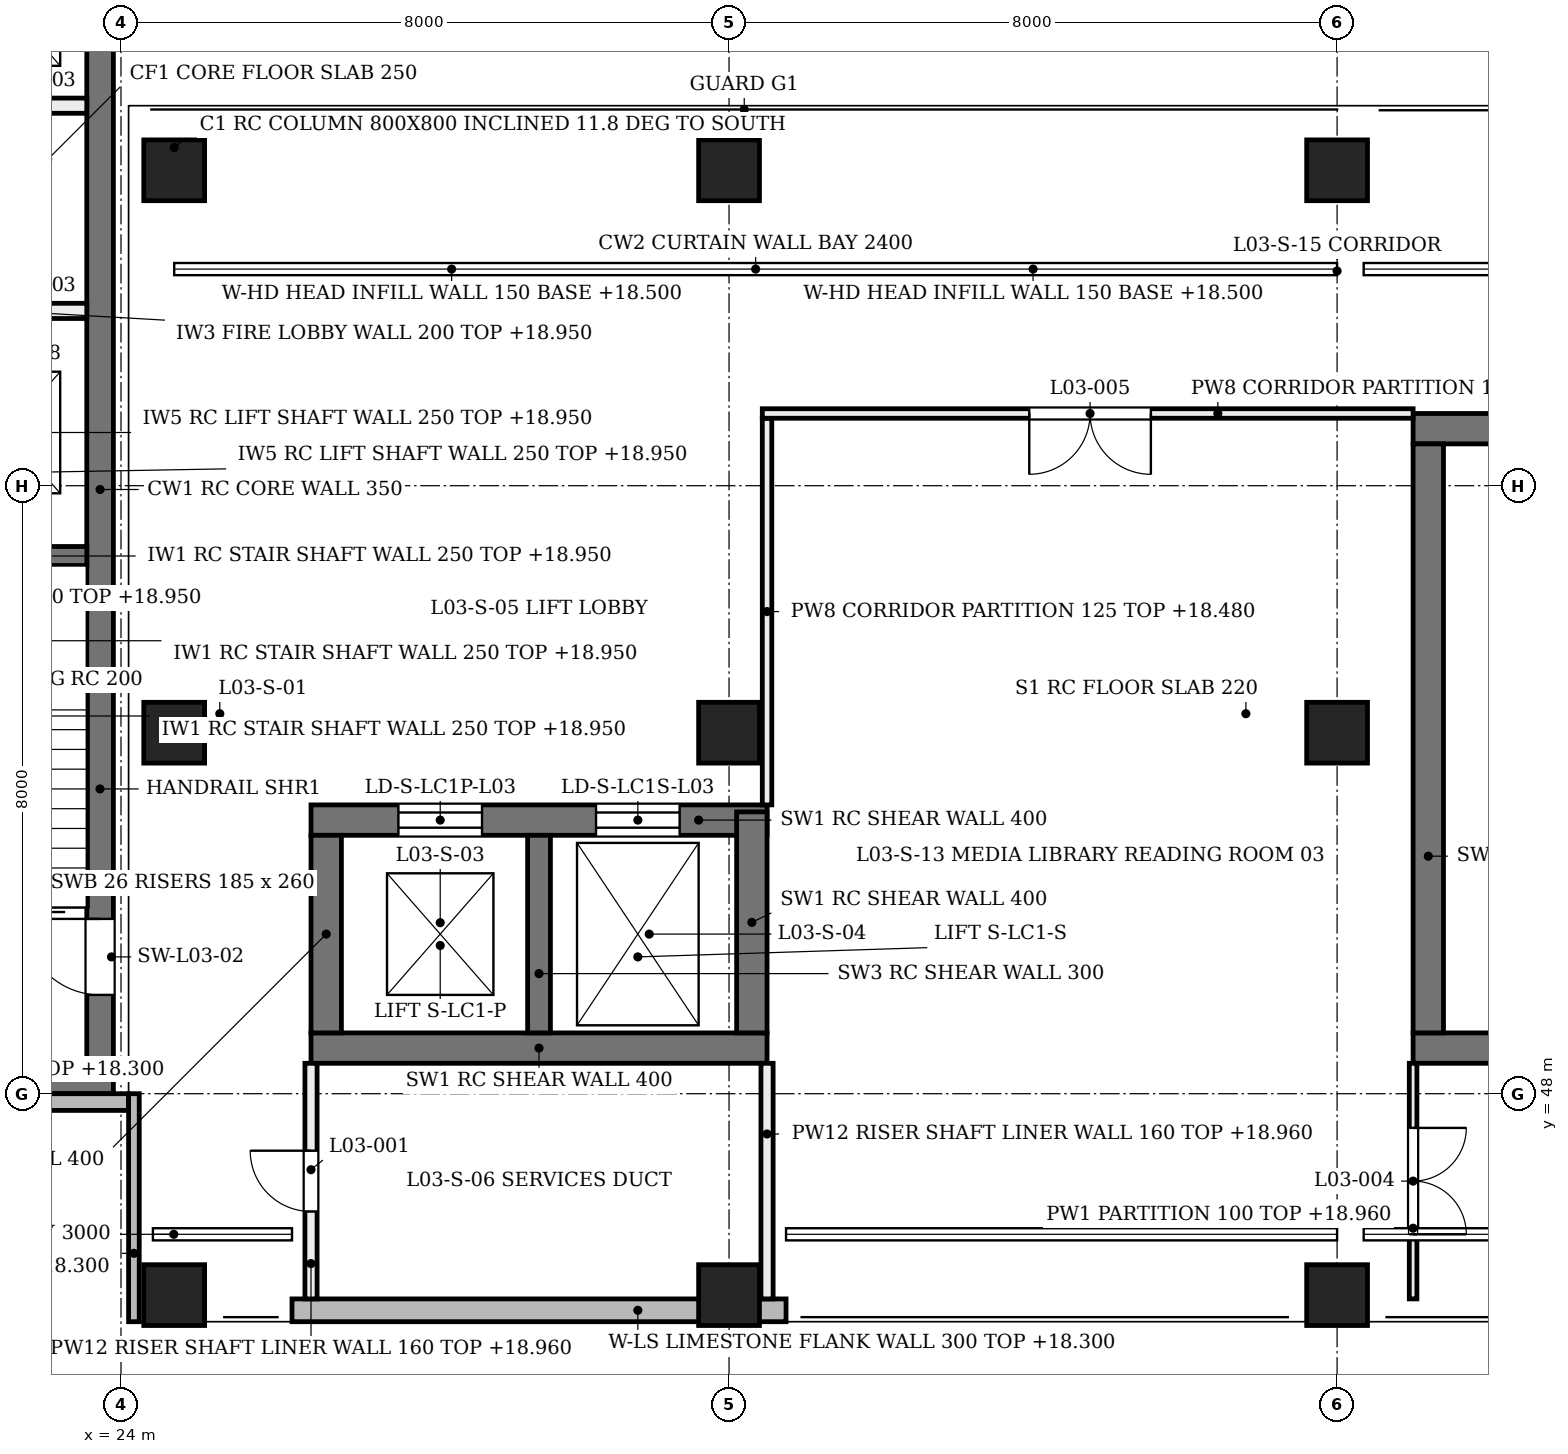
"""IFC4 building model, lengths in metres.
Left out: names, types, materials, properties, quantities, classifications, styles, units other than length and angle.
Written with IfcOpenShell. Run it as: python <this file> out.ifc"""

import sys

from ifc_helpers import new_model, si_unit, direction, frame, frame_2d, origin, origin_2d, place, context, subcontext, project, spatial, rectangle, extrude, element, fill, save


model = new_model("IFC4")
c1 = context("Model", 3, precision=1e-05, world=origin(), true_north=direction((0.0, 1.0)))
c2 = subcontext(c1, "Body", "Model", "MODEL_VIEW")
j1 = project(units=[si_unit("LENGTHUNIT", "METRE"), si_unit("PLANEANGLEUNIT", "RADIAN")], contexts=[c1])
p1 = place(None, origin())
s1 = spatial("IfcSite", under=j1, at=p1, CompositionType="ELEMENT")
p2 = place(p1, origin())
s2 = spatial("IfcBuilding", under=s1, at=p2, CompositionType="ELEMENT")
p3 = place(p2, frame((0.0, 0.0, 14.4)))
s3 = spatial("IfcBuildingStorey", under=s2, at=p3, CompositionType="ELEMENT", Elevation=14.4)
p4 = place(p3, frame((26.5, 48.6, 0.0), z_axis=(0.0, 0.0, 1.0), x_axis=(1.0, 0.0, 0.0)))
e1 = element("IfcWall", 1, at=p4, inside=s3, PredefinedType="SHEAR", context=c2, shape_type="SweptSolid", body=[
    extrude(rectangle(XDim=6.0, YDim=0.4, at=frame_2d((3.0, 0.0))), origin(), (0.0, 0.0, 1.0), 4.58),
])
p5 = place(p3, frame((26.5, 51.6, 0.0), z_axis=(0.0, 0.0, 1.0), x_axis=(1.0, 0.0, 0.0)))
e2 = element("IfcWall", 2, at=p5, inside=s3, PredefinedType="SHEAR", context=c2, shape_type="SweptSolid", body=[
    extrude(rectangle(XDim=6.0, YDim=0.4, at=frame_2d((3.0, 0.0))), origin(), (0.0, 0.0, 1.0), 4.58),
])
p6 = place(p5, frame((1.15, 0.0, 0.0)))
e3 = element("IfcOpeningElement", 3, at=p6, cuts=e2, PredefinedType="OPENING", context=c2, shape_type="SweptSolid", body=[
    extrude(rectangle(XDim=1.1, YDim=2.1, at=frame_2d((0.55, 1.05))), frame((0.0, 0.21, 0.0), z_axis=(0.0, -1.0, 0.0), x_axis=(1.0, 0.0, 0.0)), (0.0, 0.0, 1.0), 0.42),
])
p7 = place(p5, frame((3.75, 0.0, 0.0)))
e4 = element("IfcOpeningElement", 4, at=p7, cuts=e2, PredefinedType="OPENING", context=c2, shape_type="SweptSolid", body=[
    extrude(rectangle(XDim=1.1, YDim=2.1, at=frame_2d((0.55, 1.05))), frame((0.0, 0.21, 0.0), z_axis=(0.0, -1.0, 0.0), x_axis=(1.0, 0.0, 0.0)), (0.0, 0.0, 1.0), 0.42),
])
p8 = place(p3, frame((26.7, 48.8, 0.0), z_axis=(0.0, 0.0, 1.0), x_axis=(0.0, 1.0, 0.0)))
e5 = element("IfcWall", 5, at=p8, inside=s3, PredefinedType="SHEAR", context=c2, shape_type="SweptSolid", body=[
    extrude(rectangle(XDim=2.6, YDim=0.4, at=frame_2d((1.3, 0.0))), origin(), (0.0, 0.0, 1.0), 4.58),
])
p9 = place(p3, frame((32.3, 48.8, 0.0), z_axis=(0.0, 0.0, 1.0), x_axis=(0.0, 1.0, 0.0)))
e6 = element("IfcWall", 6, at=p9, inside=s3, PredefinedType="SHEAR", context=c2, shape_type="SweptSolid", body=[
    extrude(rectangle(XDim=2.908, YDim=0.4, at=frame_2d((1.454, 0.0))), origin(), (0.0, 0.0, 1.0), 4.58),
])
p10 = place(p3, frame((29.5, 48.8, 0.0), z_axis=(0.0, 0.0, 1.0), x_axis=(0.0, 1.0, 0.0)))
e7 = element("IfcWall", 7, at=p10, inside=s3, PredefinedType="SHEAR", context=c2, shape_type="SweptSolid", body=[
    extrude(rectangle(XDim=2.6, YDim=0.3, at=frame_2d((1.3, 0.0))), origin(), (0.0, 0.0, 1.0), 4.58),
])
p11 = place(p3, frame((41.0, 48.6, 0.0), z_axis=(0.0, 0.0, 1.0), x_axis=(1.0, 0.0, 0.0)))
e8 = element("IfcWall", 8, at=p11, inside=s3, PredefinedType="SHEAR", context=c2, shape_type="SweptSolid", body=[
    extrude(rectangle(XDim=22.0, YDim=0.4, at=frame_2d((11.0, 0.0))), origin(), (0.0, 0.0, 1.0), 4.58),
])
p12 = place(p3, frame((41.0, 56.75, 0.0), z_axis=(0.0, 0.0, 1.0), x_axis=(1.0, 0.0, 0.0)))
e9 = element("IfcWall", 9, at=p12, inside=s3, PredefinedType="SHEAR", context=c2, shape_type="SweptSolid", body=[
    extrude(rectangle(XDim=22.0, YDim=0.4, at=frame_2d((11.0, 0.0))), origin(), (0.0, 0.0, 1.0), 4.58),
])
p13 = place(p12, frame((10.366, 0.0, 0.0)))
e10 = element("IfcOpeningElement", 10, at=p13, cuts=e9, PredefinedType="OPENING", context=c2, shape_type="SweptSolid", body=[
    extrude(rectangle(XDim=1.5, YDim=2.1, at=frame_2d((0.75, 1.05))), frame((0.0, 0.21, 0.0), z_axis=(0.0, -1.0, 0.0), x_axis=(1.0, 0.0, 0.0)), (0.0, 0.0, 1.0), 0.42),
])
p14 = place(p3, frame((41.2, 48.8, 0.0), z_axis=(0.0, 0.0, 1.0), x_axis=(0.0, 1.0, 0.0)))
e11 = element("IfcWall", 11, at=p14, inside=s3, PredefinedType="SHEAR", context=c2, shape_type="SweptSolid", body=[
    extrude(rectangle(XDim=7.75, YDim=0.4, at=frame_2d((3.875, 0.0))), origin(), (0.0, 0.0, 1.0), 4.58),
])
p15 = place(p3, frame((15.95, 48.175, 0.0), z_axis=(0.0, 0.0, 1.0), x_axis=(1.0, 0.0, 0.0)))
e12 = element("IfcWall", 12, at=p15, inside=s3, PredefinedType="SHEAR", context=c2, shape_type="SweptSolid", body=[
    extrude(rectangle(XDim=7.95, YDim=0.35, at=frame_2d((3.975, 0.0))), origin(), (0.0, 0.0, 1.0), 4.58),
])
p16 = place(p3, frame((23.725, 48.35, 0.0), z_axis=(0.0, 0.0, 1.0), x_axis=(0.0, 1.0, 0.0)))
e13 = element("IfcWall", 13, at=p16, inside=s3, PredefinedType="SHEAR", context=c2, shape_type="SweptSolid", body=[
    extrude(rectangle(XDim=15.2, YDim=0.35, at=frame_2d((7.6, 0.0))), origin(), (0.0, 0.0, 1.0), 4.58),
])
p17 = place(p16, frame((0.95, 0.0, 0.0)))
e14 = element("IfcOpeningElement", 14, at=p17, cuts=e13, PredefinedType="OPENING", context=c2, shape_type="SweptSolid", body=[
    extrude(rectangle(XDim=1.0, YDim=2.1, at=frame_2d((0.5, 1.05))), frame((0.0, 0.185, 0.0), z_axis=(0.0, -1.0, 0.0), x_axis=(1.0, 0.0, 0.0)), (0.0, 0.0, 1.0), 0.37),
])
for number, where, z_axis, x_axis in (
    (15, (24.7, 45.6, 0.0), (0.0, -0.204, 0.979), (1.0, 0.0, 0.0)),
    (16, (32.0, 45.6, 0.0), (0.0, -0.204, 0.979), (1.0, 0.0, 0.0)),
    (17, (40.0, 45.6, 0.0), (0.0, -0.204, 0.979), (1.0, 0.0, 0.0)),
    (18, (24.7, 53.0, 0.0), (0.0, -0.204, 0.979), (1.0, 0.0, 0.0)),
    (19, (32.0, 53.0, 0.0), (0.0, -0.204, 0.979), (1.0, 0.0, 0.0)),
    (20, (40.0, 53.0, 0.0), (0.0, -0.204, 0.979), (1.0, 0.0, 0.0)),
    (21, (24.7, 60.4, 0.0), (0.0, -0.204, 0.979), (1.0, 0.0, 0.0)),
    (22, (32.0, 60.4, 0.0), (0.0, -0.204, 0.979), (1.0, 0.0, 0.0)),
    (23, (40.0, 60.4, 0.0), (0.0, -0.204, 0.979), (1.0, 0.0, 0.0)),
):
    element("IfcColumn", number, at=place(p3, frame(where, z_axis=z_axis, x_axis=x_axis)), inside=s3, PredefinedType="COLUMN", context=c2, shape_type="SweptSolid", body=[
        extrude(rectangle(XDim=0.8, YDim=0.8, at=origin_2d()), origin(), (0.0, 0.0, 1.0), 4.903),
    ])
p18 = place(p3, frame((26.25, 45.15, 0.0), z_axis=(0.0, 0.0, 1.0), x_axis=(1.0, 0.0, 0.0)))
e24 = element("IfcWall", 24, at=p18, inside=s3, PredefinedType="SOLIDWALL", context=c2, shape_type="SweptSolid", body=[
    extrude(rectangle(XDim=6.5, YDim=0.3, at=frame_2d((3.25, 0.0))), origin(), (0.0, 0.0, 1.0), 3.9),
])
p19 = place(p3, frame((24.9, 58.85, 4.1), z_axis=(0.0, 0.0, 1.0), x_axis=(1.0, 0.0, 0.0)))
e25 = element("IfcWall", 25, at=p19, inside=s3, PredefinedType="SOLIDWALL", context=c2, shape_type="SweptSolid", body=[
    extrude(rectangle(XDim=6.9, YDim=0.15, at=frame_2d((3.45, 0.0))), origin(), (0.0, 0.0, 1.0), 0.48),
])
p20 = place(p3, frame((32.2, 58.85, 4.1), z_axis=(0.0, 0.0, 1.0), x_axis=(1.0, 0.0, 0.0)))
e26 = element("IfcWall", 26, at=p20, inside=s3, PredefinedType="SOLIDWALL", context=c2, shape_type="SweptSolid", body=[
    extrude(rectangle(XDim=7.6, YDim=0.15, at=frame_2d((3.8, 0.0))), origin(), (0.0, 0.0, 1.0), 0.48),
])
p21 = place(p3, frame((15.9, 47.89, 0.0), z_axis=(0.0, 0.0, 1.0), x_axis=(1.0, 0.0, 0.0)))
e27 = element("IfcWall", 27, at=p21, inside=s3, PredefinedType="SOLIDWALL", context=c2, shape_type="SweptSolid", body=[
    extrude(rectangle(XDim=8.2, YDim=0.22, at=frame_2d((4.1, 0.0))), origin(), (0.0, 0.0, 1.0), 3.9),
])
p22 = place(p21, frame((1.108, 0.0, 0.9)))
e28 = element("IfcOpeningElement", 28, at=p22, cuts=e27, PredefinedType="OPENING", context=c2, shape_type="SweptSolid", body=[
    extrude(rectangle(XDim=0.45, YDim=2.6, at=frame_2d((0.225, 1.3))), frame((0.0, 0.12, 0.0), z_axis=(0.0, -1.0, 0.0), x_axis=(1.0, 0.0, 0.0)), (0.0, 0.0, 1.0), 0.24),
])
p23 = place(p21, frame((3.775, 0.0, 0.9)))
e29 = element("IfcOpeningElement", 29, at=p23, cuts=e27, PredefinedType="OPENING", context=c2, shape_type="SweptSolid", body=[
    extrude(rectangle(XDim=0.45, YDim=2.6, at=frame_2d((0.225, 1.3))), frame((0.0, 0.12, 0.0), z_axis=(0.0, -1.0, 0.0), x_axis=(1.0, 0.0, 0.0)), (0.0, 0.0, 1.0), 0.24),
])
p24 = place(p21, frame((6.442, 0.0, 0.9)))
e30 = element("IfcOpeningElement", 30, at=p24, cuts=e27, PredefinedType="OPENING", context=c2, shape_type="SweptSolid", body=[
    extrude(rectangle(XDim=0.45, YDim=2.6, at=frame_2d((0.225, 1.3))), frame((0.0, 0.12, 0.0), z_axis=(0.0, -1.0, 0.0), x_axis=(1.0, 0.0, 0.0)), (0.0, 0.0, 1.0), 0.24),
])
p25 = place(p3, frame((24.17, 45.0, 0.0), z_axis=(0.0, 0.0, 1.0), x_axis=(0.0, 1.0, 0.0)))
e31 = element("IfcWall", 31, at=p25, inside=s3, PredefinedType="SOLIDWALL", context=c2, shape_type="SweptSolid", body=[
    extrude(rectangle(XDim=3.0, YDim=0.14, at=frame_2d((1.5, 0.0))), origin(), (0.0, 0.0, 1.0), 3.9),
])
p26 = place(p3, frame((20.45, 55.075, 0.0), z_axis=(0.0, 0.0, 1.0), x_axis=(1.0, 0.0, 0.0)))
e32 = element("IfcWall", 32, at=p26, inside=s3, PredefinedType="SOLIDWALL", context=c2, shape_type="SweptSolid", body=[
    extrude(rectangle(XDim=3.1, YDim=0.25, at=frame_2d((1.55, 0.0))), origin(), (0.0, 0.0, 1.0), 4.55),
])
p27 = place(p3, frame((16.35, 58.3, 0.0), z_axis=(0.0, 0.0, 1.0), x_axis=(1.0, 0.0, 0.0)))
e33 = element("IfcWall", 33, at=p27, inside=s3, PredefinedType="SOLIDWALL", context=c2, shape_type="SweptSolid", body=[
    extrude(rectangle(XDim=7.2, YDim=0.2, at=frame_2d((3.6, 0.0))), origin(), (0.0, 0.0, 1.0), 4.55),
])
p28 = place(p27, frame((0.5, 0.0, 0.0)))
e34 = element("IfcOpeningElement", 34, at=p28, cuts=e33, PredefinedType="OPENING", context=c2, shape_type="SweptSolid", body=[
    extrude(rectangle(XDim=1.1, YDim=2.1, at=frame_2d((0.55, 1.05))), frame((0.0, 0.11, 0.0), z_axis=(0.0, -1.0, 0.0), x_axis=(1.0, 0.0, 0.0)), (0.0, 0.0, 1.0), 0.22),
])
p29 = place(p27, frame((5.6, 0.0, 0.0)))
e35 = element("IfcOpeningElement", 35, at=p29, cuts=e33, PredefinedType="OPENING", context=c2, shape_type="SweptSolid", body=[
    extrude(rectangle(XDim=1.1, YDim=2.1, at=frame_2d((0.55, 1.05))), frame((0.0, 0.11, 0.0), z_axis=(0.0, -1.0, 0.0), x_axis=(1.0, 0.0, 0.0)), (0.0, 0.0, 1.0), 0.22),
])
p30 = place(p27, frame((3.1, 0.0, 0.0)))
e36 = element("IfcOpeningElement", 36, at=p30, cuts=e33, PredefinedType="OPENING", context=c2, shape_type="SweptSolid", body=[
    extrude(rectangle(XDim=1.0, YDim=2.1, at=frame_2d((0.5, 1.05))), frame((0.0, 0.11, 0.0), z_axis=(0.0, -1.0, 0.0), x_axis=(1.0, 0.0, 0.0)), (0.0, 0.0, 1.0), 0.22),
])
p31 = place(p3, frame((16.35, 61.0, 0.0), z_axis=(0.0, 0.0, 1.0), x_axis=(1.0, 0.0, 0.0)))
e37 = element("IfcWall", 37, at=p31, inside=s3, PredefinedType="SOLIDWALL", context=c2, shape_type="SweptSolid", body=[
    extrude(rectangle(XDim=7.2, YDim=0.2, at=frame_2d((3.6, 0.0))), origin(), (0.0, 0.0, 1.0), 4.55),
])
p32 = place(p31, frame((0.5, 0.0, 0.0)))
e38 = element("IfcOpeningElement", 38, at=p32, cuts=e37, PredefinedType="OPENING", context=c2, shape_type="SweptSolid", body=[
    extrude(rectangle(XDim=1.1, YDim=2.1, at=frame_2d((0.55, 1.05))), frame((0.0, 0.11, 0.0), z_axis=(0.0, -1.0, 0.0), x_axis=(1.0, 0.0, 0.0)), (0.0, 0.0, 1.0), 0.22),
])
p33 = place(p31, frame((5.6, 0.0, 0.0)))
e39 = element("IfcOpeningElement", 39, at=p33, cuts=e37, PredefinedType="OPENING", context=c2, shape_type="SweptSolid", body=[
    extrude(rectangle(XDim=1.1, YDim=2.1, at=frame_2d((0.55, 1.05))), frame((0.0, 0.11, 0.0), z_axis=(0.0, -1.0, 0.0), x_axis=(1.0, 0.0, 0.0)), (0.0, 0.0, 1.0), 0.22),
])
p34 = place(p31, frame((3.1, 0.0, 0.0)))
e40 = element("IfcOpeningElement", 40, at=p34, cuts=e37, PredefinedType="OPENING", context=c2, shape_type="SweptSolid", body=[
    extrude(rectangle(XDim=1.0, YDim=2.1, at=frame_2d((0.5, 1.05))), frame((0.0, 0.11, 0.0), z_axis=(0.0, -1.0, 0.0), x_axis=(1.0, 0.0, 0.0)), (0.0, 0.0, 1.0), 0.22),
])
p35 = place(p3, frame((26.5, 45.3, 0.0), z_axis=(0.0, 0.0, 1.0), x_axis=(0.0, 1.0, 0.0)))
e41 = element("IfcWall", 41, at=p35, inside=s3, PredefinedType="PARTITIONING", context=c2, shape_type="SweptSolid", body=[
    extrude(rectangle(XDim=3.1, YDim=0.16, at=frame_2d((1.55, 0.0))), origin(), (0.0, 0.0, 1.0), 4.56),
])
p36 = place(p35, frame((1.15, 0.0, 0.0)))
e42 = element("IfcOpeningElement", 42, at=p36, cuts=e41, PredefinedType="OPENING", context=c2, shape_type="SweptSolid", body=[
    extrude(rectangle(XDim=0.8, YDim=2.1, at=frame_2d((0.4, 1.05))), frame((0.0, 0.09, 0.0), z_axis=(0.0, -1.0, 0.0), x_axis=(1.0, 0.0, 0.0)), (0.0, 0.0, 1.0), 0.18),
])
p37 = place(p3, frame((32.5, 45.3, 0.0), z_axis=(0.0, 0.0, 1.0), x_axis=(0.0, 1.0, 0.0)))
e43 = element("IfcWall", 43, at=p37, inside=s3, PredefinedType="PARTITIONING", context=c2, shape_type="SweptSolid", body=[
    extrude(rectangle(XDim=3.1, YDim=0.16, at=frame_2d((1.55, 0.0))), origin(), (0.0, 0.0, 1.0), 4.56),
])
p38 = place(p3, frame((32.5, 51.8, 0.0), z_axis=(0.0, 0.0, 1.0), x_axis=(0.0, 1.0, 0.0)))
e44 = element("IfcWall", 44, at=p38, inside=s3, PredefinedType="PARTITIONING", context=c2, shape_type="SweptSolid", body=[
    extrude(rectangle(XDim=5.087, YDim=0.125, at=frame_2d((2.544, 0.0))), origin(), (0.0, 0.0, 1.0), 4.08),
])
p39 = place(p3, frame((41.0, 45.3, 0.0), z_axis=(0.0, 0.0, 1.0), x_axis=(0.0, 1.0, 0.0)))
e45 = element("IfcWall", 45, at=p39, inside=s3, PredefinedType="PARTITIONING", context=c2, shape_type="SweptSolid", body=[
    extrude(rectangle(XDim=3.1, YDim=0.1, at=frame_2d((1.55, 0.0))), origin(), (0.0, 0.0, 1.0), 4.56),
])
p40 = place(p39, frame((0.85, 0.0, 0.0)))
e46 = element("IfcOpeningElement", 46, at=p40, cuts=e45, PredefinedType="OPENING", context=c2, shape_type="SweptSolid", body=[
    extrude(rectangle(XDim=1.4, YDim=2.2, at=frame_2d((0.7, 1.1))), frame((0.0, 0.06, 0.0), z_axis=(0.0, -1.0, 0.0), x_axis=(1.0, 0.0, 0.0)), (0.0, 0.0, 1.0), 0.12),
])
p41 = place(p3, frame((32.438, 56.95, 0.0), z_axis=(0.0, 0.0, 1.0), x_axis=(1.0, 0.0, 0.0)))
e47 = element("IfcWall", 47, at=p41, inside=s3, PredefinedType="PARTITIONING", context=c2, shape_type="SweptSolid", body=[
    extrude(rectangle(XDim=8.562, YDim=0.125, at=frame_2d((4.281, 0.0))), origin(), (0.0, 0.0, 1.0), 3.98),
])
p42 = place(p41, frame((3.512, 0.0, 0.0)))
e48 = element("IfcOpeningElement", 48, at=p42, cuts=e47, PredefinedType="OPENING", context=c2, shape_type="SweptSolid", body=[
    extrude(rectangle(XDim=1.6, YDim=2.2, at=frame_2d((0.8, 1.1))), frame((0.0, 0.073, 0.0), z_axis=(0.0, -1.0, 0.0), x_axis=(1.0, 0.0, 0.0)), (0.0, 0.0, 1.0), 0.145),
])
p43 = place(p17, frame((1.0, 0.0, 0.0), z_axis=(0.0, 0.0, 1.0), x_axis=(-1.0, 0.0, 0.0)))
e49 = element("IfcDoor", 49, at=p43, inside=s3, OperationType="SINGLE_SWING_RIGHT", PredefinedType="DOOR", context=c2, shape_type="SweptSolid", body=[
    extrude(rectangle(XDim=1.0, YDim=2.1, at=frame_2d((0.5, 1.05))), frame((0.0, 0.025, 0.0), z_axis=(0.0, -1.0, 0.0), x_axis=(1.0, 0.0, 0.0)), (0.0, 0.0, 1.0), 0.05),
])
fill(e14, e49)
p44 = place(p6, origin())
e50 = element("IfcDoor", 50, at=p44, inside=s3, OperationType="DOUBLE_DOOR_SLIDING", PredefinedType="DOOR", context=c2, shape_type="SweptSolid", body=[
    extrude(rectangle(XDim=1.1, YDim=2.1, at=frame_2d((0.55, 1.05))), frame((0.0, 0.025, 0.0), z_axis=(0.0, -1.0, 0.0), x_axis=(1.0, 0.0, 0.0)), (0.0, 0.0, 1.0), 0.05),
])
fill(e3, e50)
p45 = place(p7, origin())
e51 = element("IfcDoor", 51, at=p45, inside=s3, OperationType="DOUBLE_DOOR_SLIDING", PredefinedType="DOOR", context=c2, shape_type="SweptSolid", body=[
    extrude(rectangle(XDim=1.1, YDim=2.1, at=frame_2d((0.55, 1.05))), frame((0.0, 0.025, 0.0), z_axis=(0.0, -1.0, 0.0), x_axis=(1.0, 0.0, 0.0)), (0.0, 0.0, 1.0), 0.05),
])
fill(e4, e51)
p46 = place(p36, frame((0.8, 0.0, 0.0), z_axis=(0.0, 0.0, 1.0), x_axis=(-1.0, 0.0, 0.0)))
e52 = element("IfcDoor", 52, at=p46, inside=s3, OperationType="SINGLE_SWING_RIGHT", PredefinedType="DOOR", context=c2, shape_type="SweptSolid", body=[
    extrude(rectangle(XDim=0.8, YDim=2.1, at=frame_2d((0.4, 1.05))), frame((0.0, 0.025, 0.0), z_axis=(0.0, -1.0, 0.0), x_axis=(1.0, 0.0, 0.0)), (0.0, 0.0, 1.0), 0.05),
])
fill(e42, e52)
p47 = place(p40, frame((1.4, 0.0, 0.0), z_axis=(0.0, 0.0, 1.0), x_axis=(-1.0, 0.0, 0.0)))
e53 = element("IfcDoor", 53, at=p47, inside=s3, OperationType="DOUBLE_DOOR_SINGLE_SWING", PredefinedType="DOOR", context=c2, shape_type="SweptSolid", body=[
    extrude(rectangle(XDim=1.4, YDim=2.2, at=frame_2d((0.7, 1.1))), frame((0.0, 0.025, 0.0), z_axis=(0.0, -1.0, 0.0), x_axis=(1.0, 0.0, 0.0)), (0.0, 0.0, 1.0), 0.05),
])
fill(e46, e53)
p48 = place(p42, frame((1.6, 0.0, 0.0), z_axis=(0.0, 0.0, 1.0), x_axis=(-1.0, 0.0, 0.0)))
e54 = element("IfcDoor", 54, at=p48, inside=s3, OperationType="DOUBLE_DOOR_SINGLE_SWING", PredefinedType="DOOR", context=c2, shape_type="SweptSolid", body=[
    extrude(rectangle(XDim=1.6, YDim=2.2, at=frame_2d((0.8, 1.1))), frame((0.0, 0.025, 0.0), z_axis=(0.0, -1.0, 0.0), x_axis=(1.0, 0.0, 0.0)), (0.0, 0.0, 1.0), 0.05),
])
fill(e48, e54)
save(model, sys.argv[1])
